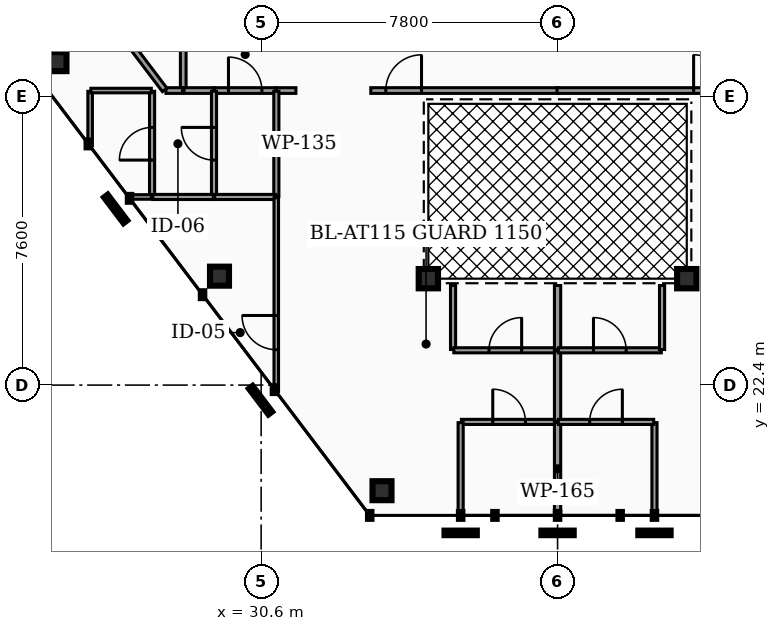
"""IFC4 building model, lengths in metres.
Left out: names, types, materials, properties, quantities, classifications, styles, units other than length and angle.
Written with IfcOpenShell. Run it as: python <this file> out.ifc"""

import sys

from ifc_helpers import new_model, si_unit, direction, frame, frame_2d, origin, origin_2d, place, context, subcontext, project, spatial, rectangle, hollow_rectangle, hollow_circle, extrude, element, fill, save


model = new_model("IFC4")
c1 = context("Model", 3, precision=1e-05, world=origin(), true_north=direction((0.0, 1.0)))
c2 = subcontext(c1, "Body", "Model", "MODEL_VIEW")
j1 = project(units=[si_unit("LENGTHUNIT", "METRE"), si_unit("PLANEANGLEUNIT", "RADIAN")], contexts=[c1])
p1 = place(None, origin())
s1 = spatial("IfcSite", under=j1, at=p1, CompositionType="ELEMENT")
p2 = place(p1, origin())
s2 = spatial("IfcBuilding", under=s1, at=p2, CompositionType="ELEMENT")
p3 = place(p2, frame((0.0, 0.0, 265.2)))
s3 = spatial("IfcBuildingStorey", under=s2, at=p3, CompositionType="ELEMENT", Elevation=265.2)
p4 = place(p3, frame((25.228, 30.91, 0.0), z_axis=(0.069456860096, 0.124399212229, 0.989798252465), x_axis=(-0.873123790234, 0.487498560949, 0.0)))
e1 = element("IfcColumn", 1, at=p4, inside=s3, PredefinedType="COLUMN", context=c2, shape_type="SweptSolid", body=[
    extrude(hollow_rectangle(XDim=0.5, YDim=0.5, WallThickness=0.025, at=origin_2d()), origin(), (0.0, 0.0, 1.0), 3.213),
])
p5 = place(p3, frame((29.504, 25.266, 0.0), z_axis=(0.070566836985, 0.127081074571, 0.989378957732), x_axis=(-0.874255855795, 0.485465445328, 0.0)))
e2 = element("IfcColumn", 2, at=p5, inside=s3, PredefinedType="COLUMN", context=c2, shape_type="SweptSolid", body=[
    extrude(hollow_rectangle(XDim=0.5, YDim=0.5, WallThickness=0.025, at=origin_2d()), origin(), (0.0, 0.0, 1.0), 3.214),
])
p6 = place(p3, frame((33.78, 19.621, 0.0), z_axis=(0.071751501429, 0.129684195175, 0.988955879483), x_axis=(-0.875001722309, 0.484119805376, 0.0)))
e3 = element("IfcColumn", 3, at=p6, inside=s3, PredefinedType="COLUMN", context=c2, shape_type="SweptSolid", body=[
    extrude(hollow_rectangle(XDim=0.5, YDim=0.5, WallThickness=0.025, at=origin_2d()), origin(), (0.0, 0.0, 1.0), 3.215),
])
for number, where, z_axis, x_axis in (
    (4, (35.0, 25.2, 0.0), (0.0, 0.0, 1.0), (1.0, 0.0, 0.0)),
    (5, (41.8, 25.2, 0.0), (0.0, 0.0, 1.0), (1.0, 0.0, 0.0)),
):
    element("IfcColumn", number, at=place(p3, frame(where, z_axis=z_axis, x_axis=x_axis)), inside=s3, PredefinedType="COLUMN", context=c2, shape_type="SweptSolid", body=[
        extrude(hollow_circle(Radius=0.254, WallThickness=0.02, at=origin_2d()), origin(), (0.0, 0.0, 1.0), 3.18),
    ])
p7 = place(p3, frame((28.55, 30.17, 0.0), z_axis=(0.0, 0.0, 1.0), x_axis=(0.0, 1.0, 0.0)))
e6 = element("IfcWall", 6, at=p7, inside=s3, PredefinedType="PARTITIONING", context=c2, shape_type="SweptSolid", body=[
    extrude(rectangle(XDim=3.06, YDim=0.15, at=frame_2d((1.53, 0.0))), origin(), (0.0, 0.0, 1.0), 2.235),
])
p8 = place(p7, frame((1.06, 0.0, 0.0)))
e7 = element("IfcOpeningElement", 7, at=p8, cuts=e6, PredefinedType="OPENING", context=c2, shape_type="SweptSolid", body=[
    extrude(rectangle(XDim=0.94, YDim=2.05, at=frame_2d((0.47, 1.025))), frame((0.0, 0.085, 0.0), z_axis=(0.0, -1.0, 0.0), x_axis=(1.0, 0.0, 0.0)), (0.0, 0.0, 1.0), 0.17),
])
p9 = place(p3, frame((28.57, 30.15, 0.0), z_axis=(0.0, 0.0, 1.0), x_axis=(1.0, 0.0, 0.0)))
e8 = element("IfcWall", 8, at=p9, inside=s3, PredefinedType="PARTITIONING", context=c2, shape_type="SweptSolid", body=[
    extrude(rectangle(XDim=0.785, YDim=0.15, at=frame_2d((0.393, 0.0))), origin(), (0.0, 0.0, 1.0), 2.235),
])
p10 = place(p3, frame((29.365, 30.15, 0.0), z_axis=(0.0, 0.0, 1.0), x_axis=(1.0, 0.0, 0.0)))
e9 = element("IfcWall", 9, at=p10, inside=s3, PredefinedType="PARTITIONING", context=c2, shape_type="SweptSolid", body=[
    extrude(rectangle(XDim=1.63, YDim=0.15, at=frame_2d((0.815, 0.0))), origin(), (0.0, 0.0, 1.0), 2.235),
])
p11 = place(p10, frame((0.375, 0.0, 0.0)))
e10 = element("IfcOpeningElement", 10, at=p11, cuts=e9, PredefinedType="OPENING", context=c2, shape_type="SweptSolid", body=[
    extrude(rectangle(XDim=0.88, YDim=2.05, at=frame_2d((0.44, 1.025))), frame((0.0, 0.085, 0.0), z_axis=(0.0, -1.0, 0.0), x_axis=(1.0, 0.0, 0.0)), (0.0, 0.0, 1.0), 0.17),
])
p12 = place(p3, frame((33.485, 30.15, 0.0), z_axis=(0.0, 0.0, 1.0), x_axis=(1.0, 0.0, 0.0)))
e11 = element("IfcWall", 11, at=p12, inside=s3, PredefinedType="PARTITIONING", context=c2, shape_type="SweptSolid", body=[
    extrude(rectangle(XDim=4.93, YDim=0.15, at=frame_2d((2.465, 0.0))), origin(), (0.0, 0.0, 1.0), 2.235),
])
p13 = place(p12, frame((0.395, 0.0, 0.0)))
e12 = element("IfcOpeningElement", 12, at=p13, cuts=e11, PredefinedType="OPENING", context=c2, shape_type="SweptSolid", body=[
    extrude(rectangle(XDim=0.94, YDim=2.05, at=frame_2d((0.47, 1.025))), frame((0.0, 0.085, 0.0), z_axis=(0.0, -1.0, 0.0), x_axis=(1.0, 0.0, 0.0)), (0.0, 0.0, 1.0), 0.17),
])
p14 = place(p3, frame((31.005, 30.15, 0.0), z_axis=(0.0, 0.0, 1.0), x_axis=(1.0, 0.0, 0.0)))
e13 = element("IfcWall", 13, at=p14, inside=s3, PredefinedType="PARTITIONING", context=c2, shape_type="SweptSolid", body=[
    extrude(rectangle(XDim=0.51, YDim=0.15, at=frame_2d((0.255, 0.0))), origin(), (0.0, 0.0, 1.0), 2.235),
])
p15 = place(p3, frame((38.385, 30.15, 0.0), z_axis=(0.0, 0.0, 1.0), x_axis=(1.0, 0.0, 0.0)))
e14 = element("IfcWall", 14, at=p15, inside=s3, PredefinedType="PARTITIONING", context=c2, shape_type="SweptSolid", body=[
    extrude(rectangle(XDim=4.93, YDim=0.15, at=frame_2d((2.465, 0.0))), origin(), (0.0, 0.0, 1.0), 2.235),
])
p16 = place(p15, frame((3.595, 0.0, 0.0)))
e15 = element("IfcOpeningElement", 15, at=p16, cuts=e14, PredefinedType="OPENING", context=c2, shape_type="SweptSolid", body=[
    extrude(rectangle(XDim=0.94, YDim=2.05, at=frame_2d((0.47, 1.025))), frame((0.0, 0.085, 0.0), z_axis=(0.0, -1.0, 0.0), x_axis=(1.0, 0.0, 0.0)), (0.0, 0.0, 1.0), 0.17),
])
p17 = place(p3, frame((28.094, 30.15, 0.0), z_axis=(0.0, 0.0, 1.0), x_axis=(1.0, 0.0, 0.0)))
e16 = element("IfcWall", 16, at=p17, inside=s3, PredefinedType="PARTITIONING", context=c2, shape_type="SweptSolid", body=[
    extrude(rectangle(XDim=0.436, YDim=0.15, at=frame_2d((0.218, 0.0))), origin(), (0.0, 0.0, 1.0), 2.235),
])
p18 = place(p3, frame((26.562, 32.146, 0.0), z_axis=(0.0, 0.0, 1.0), x_axis=(0.603891739408, -0.797066350485, 0.0)))
e17 = element("IfcWall", 17, at=p18, inside=s3, PredefinedType="PARTITIONING", context=c2, shape_type="SweptSolid", body=[
    extrude(rectangle(XDim=2.485, YDim=0.15, at=frame_2d((1.242, 0.0))), origin(), (0.0, 0.0, 1.0), 2.235),
])
p19 = place(p3, frame((29.36, 27.37, 0.0), z_axis=(0.0, 0.0, 1.0), x_axis=(0.0, 1.0, 0.0)))
e18 = element("IfcWall", 18, at=p19, inside=s3, PredefinedType="PARTITIONING", context=c2, shape_type="SweptSolid", body=[
    extrude(rectangle(XDim=2.76, YDim=0.135, at=frame_2d((1.38, 0.0))), origin(), (0.0, 0.0, 1.0), 2.235),
])
p20 = place(p19, frame((0.95, 0.0, 0.0)))
e19 = element("IfcOpeningElement", 19, at=p20, cuts=e18, PredefinedType="OPENING", context=c2, shape_type="SweptSolid", body=[
    extrude(rectangle(XDim=0.86, YDim=2.05, at=frame_2d((0.43, 1.025))), frame((0.0, 0.077, 0.0), z_axis=(0.0, -1.0, 0.0), x_axis=(1.0, 0.0, 0.0)), (0.0, 0.0, 1.0), 0.155),
])
p21 = place(p3, frame((27.73, 27.37, 0.0), z_axis=(0.0, 0.0, 1.0), x_axis=(0.0, 1.0, 0.0)))
e20 = element("IfcWall", 20, at=p21, inside=s3, PredefinedType="PARTITIONING", context=c2, shape_type="SweptSolid", body=[
    extrude(rectangle(XDim=2.76, YDim=0.135, at=frame_2d((1.38, 0.0))), origin(), (0.0, 0.0, 1.0), 2.235),
])
p22 = place(p21, frame((0.95, 0.0, 0.0)))
e21 = element("IfcOpeningElement", 21, at=p22, cuts=e20, PredefinedType="OPENING", context=c2, shape_type="SweptSolid", body=[
    extrude(rectangle(XDim=0.86, YDim=2.05, at=frame_2d((0.43, 1.025))), frame((0.0, 0.077, 0.0), z_axis=(0.0, -1.0, 0.0), x_axis=(1.0, 0.0, 0.0)), (0.0, 0.0, 1.0), 0.155),
])
p23 = place(p3, frame((27.75, 27.35, 0.0), z_axis=(0.0, 0.0, 1.0), x_axis=(1.0, 0.0, 0.0)))
e22 = element("IfcWall", 22, at=p23, inside=s3, PredefinedType="PARTITIONING", context=c2, shape_type="SweptSolid", body=[
    extrude(rectangle(XDim=1.59, YDim=0.135, at=frame_2d((0.795, 0.0))), origin(), (0.0, 0.0, 1.0), 2.235),
])
p24 = place(p3, frame((31.0, 27.37, 0.0), z_axis=(0.0, 0.0, 1.0), x_axis=(0.0, 1.0, 0.0)))
e23 = element("IfcWall", 23, at=p24, inside=s3, PredefinedType="PARTITIONING", context=c2, shape_type="SweptSolid", body=[
    extrude(rectangle(XDim=2.76, YDim=0.135, at=frame_2d((1.38, 0.0))), origin(), (0.0, 0.0, 1.0), 2.235),
])
p25 = place(p3, frame((29.38, 27.35, 0.0), z_axis=(0.0, 0.0, 1.0), x_axis=(1.0, 0.0, 0.0)))
e24 = element("IfcWall", 24, at=p25, inside=s3, PredefinedType="PARTITIONING", context=c2, shape_type="SweptSolid", body=[
    extrude(rectangle(XDim=1.6, YDim=0.135, at=frame_2d((0.8, 0.0))), origin(), (0.0, 0.0, 1.0), 2.235),
])
p26 = place(p3, frame((27.125, 27.35, 0.0), z_axis=(0.0, 0.0, 1.0), x_axis=(1.0, 0.0, 0.0)))
e25 = element("IfcWall", 25, at=p26, inside=s3, PredefinedType="PARTITIONING", context=c2, shape_type="SweptSolid", body=[
    extrude(rectangle(XDim=0.585, YDim=0.12, at=frame_2d((0.293, 0.0))), origin(), (0.0, 0.0, 1.0), 2.235),
])
p27 = place(p3, frame((26.1, 28.698, 0.0), z_axis=(0.0, 0.0, 1.0), x_axis=(0.0, 1.0, 0.0)))
e26 = element("IfcWall", 26, at=p27, inside=s3, PredefinedType="PARTITIONING", context=c2, shape_type="SweptSolid", body=[
    extrude(rectangle(XDim=1.432, YDim=0.12, at=frame_2d((0.716, 0.0))), origin(), (0.0, 0.0, 1.0), 2.235),
])
p28 = place(p3, frame((26.12, 30.15, 0.0), z_axis=(0.0, 0.0, 1.0), x_axis=(1.0, 0.0, 0.0)))
e27 = element("IfcWall", 27, at=p28, inside=s3, PredefinedType="PARTITIONING", context=c2, shape_type="SweptSolid", body=[
    extrude(rectangle(XDim=1.59, YDim=0.12, at=frame_2d((0.795, 0.0))), origin(), (0.0, 0.0, 1.0), 2.235),
])
p29 = place(p3, frame((35.65, 23.336, 0.0), z_axis=(0.0, 0.0, 1.0), x_axis=(0.0, 1.0, 0.0)))
e28 = element("IfcWall", 28, at=p29, inside=s3, PredefinedType="PARTITIONING", context=c2, shape_type="SweptSolid", body=[
    extrude(rectangle(XDim=1.684, YDim=0.135, at=frame_2d((0.842, 0.0))), origin(), (0.0, 0.0, 1.0), 2.235),
])
p30 = place(p3, frame((35.67, 23.316, 0.0), z_axis=(0.0, 0.0, 1.0), x_axis=(1.0, 0.0, 0.0)))
e29 = element("IfcWall", 29, at=p30, inside=s3, PredefinedType="PARTITIONING", context=c2, shape_type="SweptSolid", body=[
    extrude(rectangle(XDim=2.71, YDim=0.135, at=frame_2d((1.355, 0.0))), origin(), (0.0, 0.0, 1.0), 2.235),
])
p31 = place(p30, frame((0.925, 0.0, 0.0)))
e30 = element("IfcOpeningElement", 30, at=p31, cuts=e29, PredefinedType="OPENING", context=c2, shape_type="SweptSolid", body=[
    extrude(rectangle(XDim=0.86, YDim=2.05, at=frame_2d((0.43, 1.025))), frame((0.0, 0.077, 0.0), z_axis=(0.0, -1.0, 0.0), x_axis=(1.0, 0.0, 0.0)), (0.0, 0.0, 1.0), 0.155),
])
p32 = place(p3, frame((35.87, 21.431, 0.0), z_axis=(0.0, 0.0, 1.0), x_axis=(1.0, 0.0, 0.0)))
e31 = element("IfcWall", 31, at=p32, inside=s3, PredefinedType="PARTITIONING", context=c2, shape_type="SweptSolid", body=[
    extrude(rectangle(XDim=2.51, YDim=0.135, at=frame_2d((1.255, 0.0))), origin(), (0.0, 0.0, 1.0), 2.235),
])
p33 = place(p32, frame((0.825, 0.0, 0.0)))
e32 = element("IfcOpeningElement", 32, at=p33, cuts=e31, PredefinedType="OPENING", context=c2, shape_type="SweptSolid", body=[
    extrude(rectangle(XDim=0.86, YDim=2.05, at=frame_2d((0.43, 1.025))), frame((0.0, 0.077, 0.0), z_axis=(0.0, -1.0, 0.0), x_axis=(1.0, 0.0, 0.0)), (0.0, 0.0, 1.0), 0.155),
])
p34 = place(p3, frame((35.85, 18.986, 0.0), z_axis=(0.0, 0.0, 1.0), x_axis=(0.0, 1.0, 0.0)))
e33 = element("IfcWall", 33, at=p34, inside=s3, PredefinedType="PARTITIONING", context=c2, shape_type="SweptSolid", body=[
    extrude(rectangle(XDim=2.425, YDim=0.135, at=frame_2d((1.212, 0.0))), origin(), (0.0, 0.0, 1.0), 2.235),
])
p35 = place(p3, frame((30.998, 22.232, 0.0), z_axis=(0.0, 0.0, 1.0), x_axis=(0.0, 1.0, 0.0)))
e34 = element("IfcWall", 34, at=p35, inside=s3, PredefinedType="PARTITIONING", context=c2, shape_type="SweptSolid", body=[
    extrude(rectangle(XDim=5.098, YDim=0.12, at=frame_2d((2.549, 0.0))), origin(), (0.0, 0.0, 1.0), 2.235),
])
p36 = place(p35, frame((1.099, 0.0, 0.0)))
e35 = element("IfcOpeningElement", 35, at=p36, cuts=e34, PredefinedType="OPENING", context=c2, shape_type="SweptSolid", body=[
    extrude(rectangle(XDim=0.9, YDim=2.05, at=frame_2d((0.45, 1.025))), frame((0.0, 0.07, 0.0), z_axis=(0.0, -1.0, 0.0), x_axis=(1.0, 0.0, 0.0)), (0.0, 0.0, 1.0), 0.14),
])
p37 = place(p3, frame((38.4, 21.451, 0.0), z_axis=(0.0, 0.0, 1.0), x_axis=(0.0, 1.0, 0.0)))
e36 = element("IfcWall", 36, at=p37, inside=s3, PredefinedType="PARTITIONING", context=c2, shape_type="SweptSolid", body=[
    extrude(rectangle(XDim=1.844, YDim=0.165, at=frame_2d((0.922, 0.0))), origin(), (0.0, 0.0, 1.0), 2.235),
])
p38 = place(p3, frame((38.4, 23.336, 0.0), z_axis=(0.0, 0.0, 1.0), x_axis=(0.0, 1.0, 0.0)))
e37 = element("IfcWall", 37, at=p38, inside=s3, PredefinedType="PARTITIONING", context=c2, shape_type="SweptSolid", body=[
    extrude(rectangle(XDim=1.684, YDim=0.165, at=frame_2d((0.842, 0.0))), origin(), (0.0, 0.0, 1.0), 2.235),
])
p39 = place(p3, frame((38.4, 18.986, 0.0), z_axis=(0.0, 0.0, 1.0), x_axis=(0.0, 1.0, 0.0)))
e38 = element("IfcWall", 38, at=p39, inside=s3, PredefinedType="PARTITIONING", context=c2, shape_type="SweptSolid", body=[
    extrude(rectangle(XDim=2.425, YDim=0.165, at=frame_2d((1.212, 0.0))), origin(), (0.0, 0.0, 1.0), 2.235),
])
p40 = place(p3, frame((38.42, 23.316, 0.0), z_axis=(0.0, 0.0, 1.0), x_axis=(1.0, 0.0, 0.0)))
e39 = element("IfcWall", 39, at=p40, inside=s3, PredefinedType="PARTITIONING", context=c2, shape_type="SweptSolid", body=[
    extrude(rectangle(XDim=2.71, YDim=0.135, at=frame_2d((1.355, 0.0))), origin(), (0.0, 0.0, 1.0), 2.235),
])
p41 = place(p40, frame((0.925, 0.0, 0.0)))
e40 = element("IfcOpeningElement", 40, at=p41, cuts=e39, PredefinedType="OPENING", context=c2, shape_type="SweptSolid", body=[
    extrude(rectangle(XDim=0.86, YDim=2.05, at=frame_2d((0.43, 1.025))), frame((0.0, 0.077, 0.0), z_axis=(0.0, -1.0, 0.0), x_axis=(1.0, 0.0, 0.0)), (0.0, 0.0, 1.0), 0.155),
])
p42 = place(p3, frame((41.15, 23.336, 0.0), z_axis=(0.0, 0.0, 1.0), x_axis=(0.0, 1.0, 0.0)))
e41 = element("IfcWall", 41, at=p42, inside=s3, PredefinedType="PARTITIONING", context=c2, shape_type="SweptSolid", body=[
    extrude(rectangle(XDim=1.684, YDim=0.135, at=frame_2d((0.842, 0.0))), origin(), (0.0, 0.0, 1.0), 2.235),
])
p43 = place(p3, frame((40.95, 18.986, 0.0), z_axis=(0.0, 0.0, 1.0), x_axis=(0.0, 1.0, 0.0)))
e42 = element("IfcWall", 42, at=p43, inside=s3, PredefinedType="PARTITIONING", context=c2, shape_type="SweptSolid", body=[
    extrude(rectangle(XDim=2.425, YDim=0.135, at=frame_2d((1.212, 0.0))), origin(), (0.0, 0.0, 1.0), 2.235),
])
p44 = place(p3, frame((38.42, 21.431, 0.0), z_axis=(0.0, 0.0, 1.0), x_axis=(1.0, 0.0, 0.0)))
e43 = element("IfcWall", 43, at=p44, inside=s3, PredefinedType="PARTITIONING", context=c2, shape_type="SweptSolid", body=[
    extrude(rectangle(XDim=2.51, YDim=0.135, at=frame_2d((1.255, 0.0))), origin(), (0.0, 0.0, 1.0), 2.235),
])
p45 = place(p44, frame((0.825, 0.0, 0.0)))
e44 = element("IfcOpeningElement", 44, at=p45, cuts=e43, PredefinedType="OPENING", context=c2, shape_type="SweptSolid", body=[
    extrude(rectangle(XDim=0.86, YDim=2.05, at=frame_2d((0.43, 1.025))), frame((0.0, 0.077, 0.0), z_axis=(0.0, -1.0, 0.0), x_axis=(1.0, 0.0, 0.0)), (0.0, 0.0, 1.0), 0.155),
])
p46 = place(p11, origin())
e45 = element("IfcDoor", 45, at=p46, inside=s3, OperationType="SINGLE_SWING_LEFT", PredefinedType="DOOR", context=c2, shape_type="SweptSolid", body=[
    extrude(rectangle(XDim=0.88, YDim=2.05, at=frame_2d((0.44, 1.025))), frame((0.0, 0.025, 0.0), z_axis=(0.0, -1.0, 0.0), x_axis=(1.0, 0.0, 0.0)), (0.0, 0.0, 1.0), 0.05),
])
fill(e10, e45)
p47 = place(p13, origin())
e46 = element("IfcDoor", 46, at=p47, inside=s3, OperationType="SINGLE_SWING_RIGHT", PredefinedType="DOOR", context=c2, shape_type="SweptSolid", body=[
    extrude(rectangle(XDim=0.94, YDim=2.05, at=frame_2d((0.47, 1.025))), frame((0.0, 0.025, 0.0), z_axis=(0.0, -1.0, 0.0), x_axis=(1.0, 0.0, 0.0)), (0.0, 0.0, 1.0), 0.05),
])
fill(e12, e46)
p48 = place(p16, origin())
e47 = element("IfcDoor", 47, at=p48, inside=s3, OperationType="SINGLE_SWING_LEFT", PredefinedType="DOOR", context=c2, shape_type="SweptSolid", body=[
    extrude(rectangle(XDim=0.94, YDim=2.05, at=frame_2d((0.47, 1.025))), frame((0.0, 0.025, 0.0), z_axis=(0.0, -1.0, 0.0), x_axis=(1.0, 0.0, 0.0)), (0.0, 0.0, 1.0), 0.05),
])
fill(e15, e47)
p49 = place(p20, origin())
e48 = element("IfcDoor", 48, at=p49, inside=s3, OperationType="SINGLE_SWING_RIGHT", PredefinedType="DOOR", context=c2, shape_type="SweptSolid", body=[
    extrude(rectangle(XDim=0.86, YDim=2.05, at=frame_2d((0.43, 1.025))), frame((0.0, 0.025, 0.0), z_axis=(0.0, -1.0, 0.0), x_axis=(1.0, 0.0, 0.0)), (0.0, 0.0, 1.0), 0.05),
])
fill(e19, e48)
p50 = place(p22, origin())
e49 = element("IfcDoor", 49, at=p50, inside=s3, OperationType="SINGLE_SWING_LEFT", PredefinedType="DOOR", context=c2, shape_type="SweptSolid", body=[
    extrude(rectangle(XDim=0.86, YDim=2.05, at=frame_2d((0.43, 1.025))), frame((0.0, 0.025, 0.0), z_axis=(0.0, -1.0, 0.0), x_axis=(1.0, 0.0, 0.0)), (0.0, 0.0, 1.0), 0.05),
])
fill(e21, e49)
p51 = place(p31, origin())
e50 = element("IfcDoor", 50, at=p51, inside=s3, OperationType="SINGLE_SWING_RIGHT", PredefinedType="DOOR", context=c2, shape_type="SweptSolid", body=[
    extrude(rectangle(XDim=0.86, YDim=2.05, at=frame_2d((0.43, 1.025))), frame((0.0, 0.025, 0.0), z_axis=(0.0, -1.0, 0.0), x_axis=(1.0, 0.0, 0.0)), (0.0, 0.0, 1.0), 0.05),
])
fill(e30, e50)
p52 = place(p33, origin())
e51 = element("IfcDoor", 51, at=p52, inside=s3, OperationType="SINGLE_SWING_LEFT", PredefinedType="DOOR", context=c2, shape_type="SweptSolid", body=[
    extrude(rectangle(XDim=0.86, YDim=2.05, at=frame_2d((0.43, 1.025))), frame((0.0, 0.025, 0.0), z_axis=(0.0, -1.0, 0.0), x_axis=(1.0, 0.0, 0.0)), (0.0, 0.0, 1.0), 0.05),
])
fill(e32, e51)
p53 = place(p36, origin())
e52 = element("IfcDoor", 52, at=p53, inside=s3, OperationType="SINGLE_SWING_RIGHT", PredefinedType="DOOR", context=c2, shape_type="SweptSolid", body=[
    extrude(rectangle(XDim=0.9, YDim=2.05, at=frame_2d((0.45, 1.025))), frame((0.0, 0.025, 0.0), z_axis=(0.0, -1.0, 0.0), x_axis=(1.0, 0.0, 0.0)), (0.0, 0.0, 1.0), 0.05),
])
fill(e35, e52)
p54 = place(p41, origin())
e53 = element("IfcDoor", 53, at=p54, inside=s3, OperationType="SINGLE_SWING_LEFT", PredefinedType="DOOR", context=c2, shape_type="SweptSolid", body=[
    extrude(rectangle(XDim=0.86, YDim=2.05, at=frame_2d((0.43, 1.025))), frame((0.0, 0.025, 0.0), z_axis=(0.0, -1.0, 0.0), x_axis=(1.0, 0.0, 0.0)), (0.0, 0.0, 1.0), 0.05),
])
fill(e40, e53)
p55 = place(p45, origin())
e54 = element("IfcDoor", 54, at=p55, inside=s3, OperationType="SINGLE_SWING_RIGHT", PredefinedType="DOOR", context=c2, shape_type="SweptSolid", body=[
    extrude(rectangle(XDim=0.86, YDim=2.05, at=frame_2d((0.43, 1.025))), frame((0.0, 0.025, 0.0), z_axis=(0.0, -1.0, 0.0), x_axis=(1.0, 0.0, 0.0)), (0.0, 0.0, 1.0), 0.05),
])
fill(e44, e54)
save(model, sys.argv[1])
